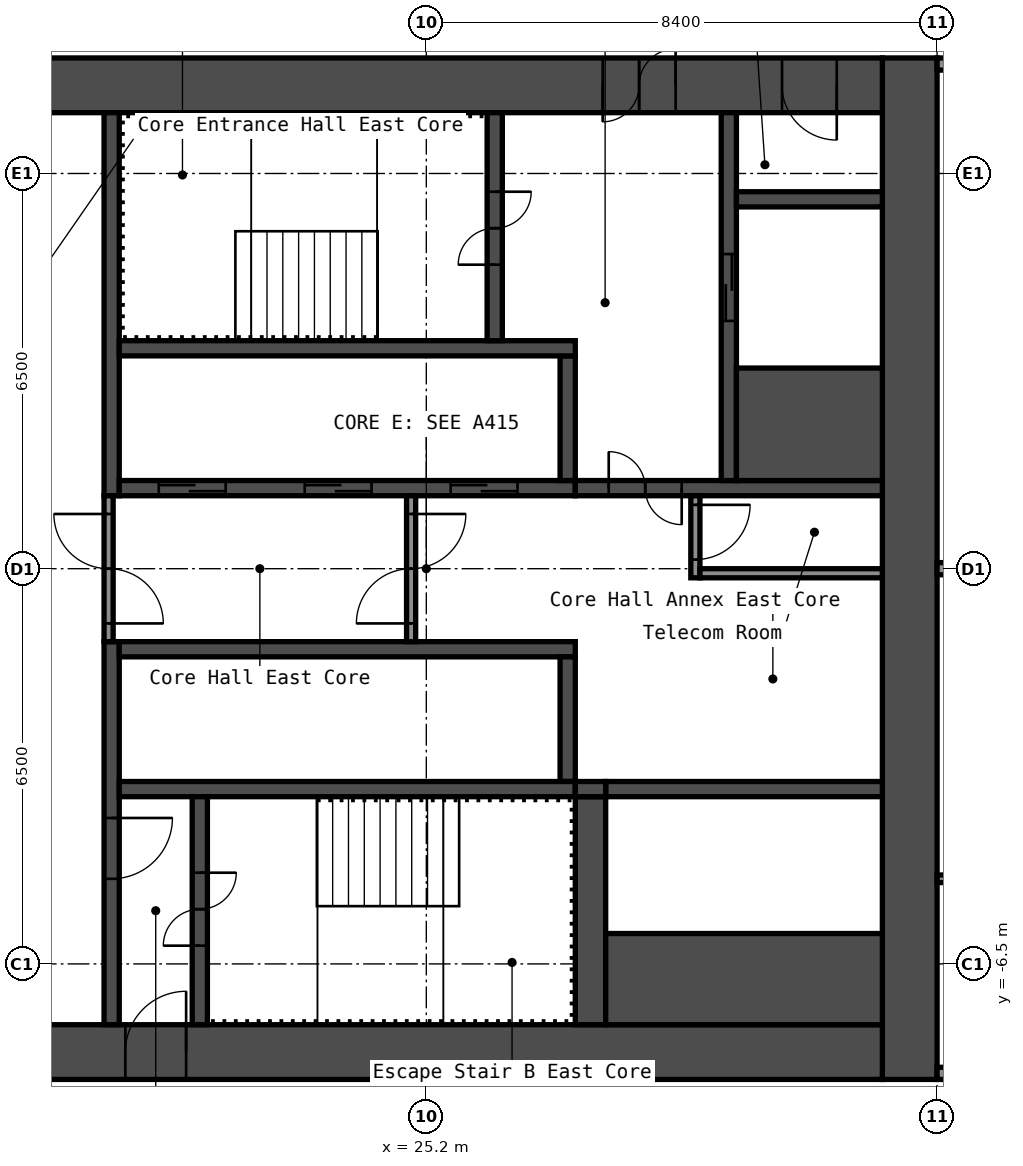
"""IFC4 building model, lengths in metres.
Left out: names, types, materials, properties, quantities, classifications, styles, units other than length and angle.
Written with IfcOpenShell. Run it as: python <this file> out.ifc"""

import sys

from ifc_helpers import new_model, si_unit, direction, frame, frame_2d, origin, place, context, subcontext, project, spatial, rectangle, extrude, element, fill, save


model = new_model("IFC4")
c1 = context("Model", 3, precision=1e-05, world=origin(), true_north=direction((0.0, 1.0)))
c2 = subcontext(c1, "Body", "Model", "MODEL_VIEW")
j1 = project(units=[si_unit("LENGTHUNIT", "METRE"), si_unit("PLANEANGLEUNIT", "RADIAN")], contexts=[c1])
p1 = place(None, origin())
s1 = spatial("IfcSite", under=j1, at=p1, CompositionType="ELEMENT")
p2 = place(p1, origin())
s2 = spatial("IfcBuilding", under=s1, at=p2, CompositionType="ELEMENT")
p3 = place(p2, frame((0.0, 0.0, 107.4)))
s3 = spatial("IfcBuildingStorey", under=s2, at=p3, CompositionType="ELEMENT", Elevation=107.4)
p4 = place(p3, frame((33.15, -8.4, 0.0), z_axis=(0.0, 0.0, 1.0), x_axis=(0.0, 1.0, 0.0)))
e1 = element("IfcWall", 1, at=p4, inside=s3, PredefinedType="SHEAR", context=c2, shape_type="SweptSolid", body=[
    extrude(rectangle(XDim=16.8, YDim=0.9, at=frame_2d((8.4, 0.0))), origin(), (0.0, 0.0, 1.0), 2.8),
])
p5 = place(p3, frame((17.7, 7.95, 0.0), z_axis=(0.0, 0.0, 1.0), x_axis=(1.0, 0.0, 0.0)))
e2 = element("IfcWall", 2, at=p5, inside=s3, PredefinedType="SHEAR", context=c2, shape_type="SweptSolid", body=[
    extrude(rectangle(XDim=15.0, YDim=0.9, at=frame_2d((7.5, 0.0))), origin(), (0.0, 0.0, 1.0), 2.8),
])
p6 = place(p5, frame((10.4, 0.0, 0.0)))
e3 = element("IfcOpeningElement", 3, at=p6, cuts=e2, PredefinedType="OPENING", context=c2, shape_type="SweptSolid", body=[
    extrude(rectangle(XDim=1.2, YDim=2.1, at=frame_2d((0.6, 1.05))), frame((0.0, 0.46, 0.0), z_axis=(0.0, -1.0, 0.0), x_axis=(1.0, 0.0, 0.0)), (0.0, 0.0, 1.0), 0.92),
])
p7 = place(p5, frame((13.35, 0.0, 0.0)))
e4 = element("IfcOpeningElement", 4, at=p7, cuts=e2, PredefinedType="OPENING", context=c2, shape_type="SweptSolid", body=[
    extrude(rectangle(XDim=0.9, YDim=2.1, at=frame_2d((0.45, 1.05))), frame((0.0, 0.46, 0.0), z_axis=(0.0, -1.0, 0.0), x_axis=(1.0, 0.0, 0.0)), (0.0, 0.0, 1.0), 0.92),
])
p8 = place(p3, frame((17.7, -7.95, 0.0), z_axis=(0.0, 0.0, 1.0), x_axis=(1.0, 0.0, 0.0)))
e5 = element("IfcWall", 5, at=p8, inside=s3, PredefinedType="SHEAR", context=c2, shape_type="SweptSolid", body=[
    extrude(rectangle(XDim=15.0, YDim=0.9, at=frame_2d((7.5, 0.0))), origin(), (0.0, 0.0, 1.0), 2.8),
])
p9 = place(p8, frame((2.55, 0.0, 0.0)))
e6 = element("IfcOpeningElement", 6, at=p9, cuts=e5, PredefinedType="OPENING", context=c2, shape_type="SweptSolid", body=[
    extrude(rectangle(XDim=1.0, YDim=2.1, at=frame_2d((0.5, 1.05))), frame((0.0, 0.46, 0.0), z_axis=(0.0, -1.0, 0.0), x_axis=(1.0, 0.0, 0.0)), (0.0, 0.0, 1.0), 0.92),
])
p10 = place(p3, frame((20.025, 1.2, 0.0), z_axis=(0.0, 0.0, 1.0), x_axis=(0.0, 1.0, 0.0)))
e7 = element("IfcWall", 7, at=p10, inside=s3, PredefinedType="SHEAR", context=c2, shape_type="SweptSolid", body=[
    extrude(rectangle(XDim=6.3, YDim=0.25, at=frame_2d((3.15, 0.0))), origin(), (0.0, 0.0, 1.0), 2.8),
])
p11 = place(p3, frame((20.025, -7.5, 0.0), z_axis=(0.0, 0.0, 1.0), x_axis=(0.0, 1.0, 0.0)))
e8 = element("IfcWall", 8, at=p11, inside=s3, PredefinedType="SHEAR", context=c2, shape_type="SweptSolid", body=[
    extrude(rectangle(XDim=6.3, YDim=0.25, at=frame_2d((3.15, 0.0))), origin(), (0.0, 0.0, 1.0), 2.8),
])
p12 = place(p11, frame((2.4, 0.0, 0.0)))
e9 = element("IfcOpeningElement", 9, at=p12, cuts=e8, PredefinedType="OPENING", context=c2, shape_type="SweptSolid", body=[
    extrude(rectangle(XDim=1.0, YDim=2.1, at=frame_2d((0.5, 1.05))), frame((0.0, 0.135, 0.0), z_axis=(0.0, -1.0, 0.0), x_axis=(1.0, 0.0, 0.0)), (0.0, 0.0, 1.0), 0.27),
])
p13 = place(p3, frame((20.15, 1.325, 0.0), z_axis=(0.0, 0.0, 1.0), x_axis=(1.0, 0.0, 0.0)))
e10 = element("IfcWall", 10, at=p13, inside=s3, PredefinedType="SHEAR", context=c2, shape_type="SweptSolid", body=[
    extrude(rectangle(XDim=7.5, YDim=0.25, at=frame_2d((3.75, 0.0))), origin(), (0.0, 0.0, 1.0), 2.8),
])
p14 = place(p13, frame((0.65, 0.0, 0.0)))
e11 = element("IfcOpeningElement", 11, at=p14, cuts=e10, PredefinedType="OPENING", context=c2, shape_type="SweptSolid", body=[
    extrude(rectangle(XDim=1.1, YDim=2.1, at=frame_2d((0.55, 1.05))), frame((0.0, 0.135, 0.0), z_axis=(0.0, -1.0, 0.0), x_axis=(1.0, 0.0, 0.0)), (0.0, 0.0, 1.0), 0.27),
])
p15 = place(p13, frame((3.05, 0.0, 0.0)))
e12 = element("IfcOpeningElement", 12, at=p15, cuts=e10, PredefinedType="OPENING", context=c2, shape_type="SweptSolid", body=[
    extrude(rectangle(XDim=1.1, YDim=2.1, at=frame_2d((0.55, 1.05))), frame((0.0, 0.135, 0.0), z_axis=(0.0, -1.0, 0.0), x_axis=(1.0, 0.0, 0.0)), (0.0, 0.0, 1.0), 0.27),
])
p16 = place(p13, frame((5.45, 0.0, 0.0)))
e13 = element("IfcOpeningElement", 13, at=p16, cuts=e10, PredefinedType="OPENING", context=c2, shape_type="SweptSolid", body=[
    extrude(rectangle(XDim=1.1, YDim=2.1, at=frame_2d((0.55, 1.05))), frame((0.0, 0.135, 0.0), z_axis=(0.0, -1.0, 0.0), x_axis=(1.0, 0.0, 0.0)), (0.0, 0.0, 1.0), 0.27),
])
p17 = place(p3, frame((27.525, 1.45, 0.0), z_axis=(0.0, 0.0, 1.0), x_axis=(0.0, 1.0, 0.0)))
e14 = element("IfcWall", 14, at=p17, inside=s3, PredefinedType="SHEAR", context=c2, shape_type="SweptSolid", body=[
    extrude(rectangle(XDim=2.05, YDim=0.25, at=frame_2d((1.025, 0.0))), origin(), (0.0, 0.0, 1.0), 2.8),
])
p18 = place(p3, frame((20.15, 3.625, 0.0), z_axis=(0.0, 0.0, 1.0), x_axis=(1.0, 0.0, 0.0)))
e15 = element("IfcWall", 15, at=p18, inside=s3, PredefinedType="SHEAR", context=c2, shape_type="SweptSolid", body=[
    extrude(rectangle(XDim=7.5, YDim=0.25, at=frame_2d((3.75, 0.0))), origin(), (0.0, 0.0, 1.0), 2.8),
])
p19 = place(p3, frame((26.325, 3.75, 0.0), z_axis=(0.0, 0.0, 1.0), x_axis=(0.0, 1.0, 0.0)))
e16 = element("IfcWall", 16, at=p19, inside=s3, PredefinedType="SHEAR", context=c2, shape_type="SweptSolid", body=[
    extrude(rectangle(XDim=3.75, YDim=0.25, at=frame_2d((1.875, 0.0))), origin(), (0.0, 0.0, 1.0), 2.8),
])
p20 = place(p19, frame((1.25, 0.0, 0.0)))
e17 = element("IfcOpeningElement", 17, at=p20, cuts=e16, PredefinedType="OPENING", context=c2, shape_type="SweptSolid", body=[
    extrude(rectangle(XDim=1.2, YDim=2.1, at=frame_2d((0.6, 1.05))), frame((0.0, 0.135, 0.0), z_axis=(0.0, -1.0, 0.0), x_axis=(1.0, 0.0, 0.0)), (0.0, 0.0, 1.0), 0.27),
])
p21 = place(p3, frame((27.65, 1.325, 0.0), z_axis=(0.0, 0.0, 1.0), x_axis=(1.0, 0.0, 0.0)))
e18 = element("IfcWall", 18, at=p21, inside=s3, PredefinedType="SHEAR", context=c2, shape_type="SweptSolid", body=[
    extrude(rectangle(XDim=5.05, YDim=0.25, at=frame_2d((2.525, 0.0))), origin(), (0.0, 0.0, 1.0), 2.8),
])
p22 = place(p21, frame((0.55, 0.0, 0.0)))
e19 = element("IfcOpeningElement", 19, at=p22, cuts=e18, PredefinedType="OPENING", context=c2, shape_type="SweptSolid", body=[
    extrude(rectangle(XDim=1.2, YDim=2.1, at=frame_2d((0.6, 1.05))), frame((0.0, 0.135, 0.0), z_axis=(0.0, -1.0, 0.0), x_axis=(1.0, 0.0, 0.0)), (0.0, 0.0, 1.0), 0.27),
])
p23 = place(p3, frame((30.175, 1.45, 0.0), z_axis=(0.0, 0.0, 1.0), x_axis=(0.0, 1.0, 0.0)))
e20 = element("IfcWall", 20, at=p23, inside=s3, PredefinedType="SHEAR", context=c2, shape_type="SweptSolid", body=[
    extrude(rectangle(XDim=6.05, YDim=0.25, at=frame_2d((3.025, 0.0))), origin(), (0.0, 0.0, 1.0), 2.8),
])
p24 = place(p23, frame((2.625, 0.0, 0.0)))
e21 = element("IfcOpeningElement", 21, at=p24, cuts=e20, PredefinedType="OPENING", context=c2, shape_type="SweptSolid", body=[
    extrude(rectangle(XDim=1.1, YDim=2.1, at=frame_2d((0.55, 1.05))), frame((0.0, 0.135, 0.0), z_axis=(0.0, -1.0, 0.0), x_axis=(1.0, 0.0, 0.0)), (0.0, 0.0, 1.0), 0.27),
])
p25 = place(p3, frame((30.3, 2.375, 0.0), z_axis=(0.0, 0.0, 1.0), x_axis=(1.0, 0.0, 0.0)))
e22 = element("IfcWall", 22, at=p25, inside=s3, PredefinedType="SHEAR", context=c2, shape_type="SweptSolid", body=[
    extrude(rectangle(XDim=2.4, YDim=1.85, at=frame_2d((1.2, 0.0))), origin(), (0.0, 0.0, 1.0), 2.8),
])
p26 = place(p3, frame((30.3, 6.075, 0.0), z_axis=(0.0, 0.0, 1.0), x_axis=(1.0, 0.0, 0.0)))
e23 = element("IfcWall", 23, at=p26, inside=s3, PredefinedType="SHEAR", context=c2, shape_type="SweptSolid", body=[
    extrude(rectangle(XDim=2.4, YDim=0.25, at=frame_2d((1.2, 0.0))), origin(), (0.0, 0.0, 1.0), 2.8),
])
p27 = place(p3, frame((20.15, -1.325, 0.0), z_axis=(0.0, 0.0, 1.0), x_axis=(1.0, 0.0, 0.0)))
e24 = element("IfcWall", 24, at=p27, inside=s3, PredefinedType="SHEAR", context=c2, shape_type="SweptSolid", body=[
    extrude(rectangle(XDim=7.5, YDim=0.25, at=frame_2d((3.75, 0.0))), origin(), (0.0, 0.0, 1.0), 2.8),
])
p28 = place(p3, frame((27.525, -3.5, 0.0), z_axis=(0.0, 0.0, 1.0), x_axis=(0.0, 1.0, 0.0)))
e25 = element("IfcWall", 25, at=p28, inside=s3, PredefinedType="SHEAR", context=c2, shape_type="SweptSolid", body=[
    extrude(rectangle(XDim=2.05, YDim=0.25, at=frame_2d((1.025, 0.0))), origin(), (0.0, 0.0, 1.0), 2.8),
])
p29 = place(p3, frame((20.15, -3.625, 0.0), z_axis=(0.0, 0.0, 1.0), x_axis=(1.0, 0.0, 0.0)))
e26 = element("IfcWall", 26, at=p29, inside=s3, PredefinedType="SHEAR", context=c2, shape_type="SweptSolid", body=[
    extrude(rectangle(XDim=7.5, YDim=0.25, at=frame_2d((3.75, 0.0))), origin(), (0.0, 0.0, 1.0), 2.8),
])
p30 = place(p3, frame((21.475, -7.5, 0.0), z_axis=(0.0, 0.0, 1.0), x_axis=(0.0, 1.0, 0.0)))
e27 = element("IfcWall", 27, at=p30, inside=s3, PredefinedType="SHEAR", context=c2, shape_type="SweptSolid", body=[
    extrude(rectangle(XDim=3.75, YDim=0.25, at=frame_2d((1.875, 0.0))), origin(), (0.0, 0.0, 1.0), 2.8),
])
p31 = place(p30, frame((1.3, 0.0, 0.0)))
e28 = element("IfcOpeningElement", 28, at=p31, cuts=e27, PredefinedType="OPENING", context=c2, shape_type="SweptSolid", body=[
    extrude(rectangle(XDim=1.2, YDim=2.1, at=frame_2d((0.6, 1.05))), frame((0.0, 0.135, 0.0), z_axis=(0.0, -1.0, 0.0), x_axis=(1.0, 0.0, 0.0)), (0.0, 0.0, 1.0), 0.27),
])
p32 = place(p3, frame((27.9, -7.5, 0.0), z_axis=(0.0, 0.0, 1.0), x_axis=(0.0, 1.0, 0.0)))
e29 = element("IfcWall", 29, at=p32, inside=s3, PredefinedType="SHEAR", context=c2, shape_type="SweptSolid", body=[
    extrude(rectangle(XDim=3.75, YDim=0.5, at=frame_2d((1.875, 0.0))), origin(), (0.0, 0.0, 1.0), 2.8),
])
p33 = place(p3, frame((28.15, -3.625, 0.0), z_axis=(0.0, 0.0, 1.0), x_axis=(1.0, 0.0, 0.0)))
e30 = element("IfcWall", 30, at=p33, inside=s3, PredefinedType="SHEAR", context=c2, shape_type="SweptSolid", body=[
    extrude(rectangle(XDim=4.55, YDim=0.25, at=frame_2d((2.275, 0.0))), origin(), (0.0, 0.0, 1.0), 2.8),
])
p34 = place(p3, frame((28.15, -6.75, 0.0), z_axis=(0.0, 0.0, 1.0), x_axis=(1.0, 0.0, 0.0)))
e31 = element("IfcWall", 31, at=p34, inside=s3, PredefinedType="SHEAR", context=c2, shape_type="SweptSolid", body=[
    extrude(rectangle(XDim=4.55, YDim=1.5, at=frame_2d((2.275, 0.0))), origin(), (0.0, 0.0, 1.0), 2.8),
])
p35 = place(p3, frame((27.65, -3.625, 0.0), z_axis=(0.0, 0.0, 1.0), x_axis=(1.0, 0.0, 0.0)))
e32 = element("IfcWall", 32, at=p35, inside=s3, PredefinedType="SHEAR", context=c2, shape_type="SweptSolid", body=[
    extrude(rectangle(XDim=0.5, YDim=0.25, at=frame_2d((0.25, 0.0))), origin(), (0.0, 0.0, 1.0), 2.8),
])
p36 = place(p3, frame((19.975, -1.2, 0.0), z_axis=(0.0, 0.0, 1.0), x_axis=(0.0, 1.0, 0.0)))
e33 = element("IfcWall", 33, at=p36, inside=s3, PredefinedType="PARTITIONING", context=c2, shape_type="SweptSolid", body=[
    extrude(rectangle(XDim=2.4, YDim=0.15, at=frame_2d((1.2, 0.0))), origin(), (0.0, 0.0, 1.0), 2.8),
])
p37 = place(p36, frame((0.3, 0.0, 0.0)))
e34 = element("IfcOpeningElement", 34, at=p37, cuts=e33, PredefinedType="OPENING", context=c2, shape_type="SweptSolid", body=[
    extrude(rectangle(XDim=1.8, YDim=2.1, at=frame_2d((0.9, 1.05))), frame((0.0, 0.085, 0.0), z_axis=(0.0, -1.0, 0.0), x_axis=(1.0, 0.0, 0.0)), (0.0, 0.0, 1.0), 0.17),
])
p38 = place(p3, frame((24.95, -1.2, 0.0), z_axis=(0.0, 0.0, 1.0), x_axis=(0.0, 1.0, 0.0)))
e35 = element("IfcWall", 35, at=p38, inside=s3, PredefinedType="PARTITIONING", context=c2, shape_type="SweptSolid", body=[
    extrude(rectangle(XDim=2.4, YDim=0.15, at=frame_2d((1.2, 0.0))), origin(), (0.0, 0.0, 1.0), 2.8),
])
p39 = place(p38, frame((0.3, 0.0, 0.0)))
e36 = element("IfcOpeningElement", 36, at=p39, cuts=e35, PredefinedType="OPENING", context=c2, shape_type="SweptSolid", body=[
    extrude(rectangle(XDim=1.8, YDim=2.1, at=frame_2d((0.9, 1.05))), frame((0.0, 0.085, 0.0), z_axis=(0.0, -1.0, 0.0), x_axis=(1.0, 0.0, 0.0)), (0.0, 0.0, 1.0), 0.17),
])
p40 = place(p3, frame((29.625, -0.15, 0.0), z_axis=(0.0, 0.0, 1.0), x_axis=(0.0, 1.0, 0.0)))
e37 = element("IfcWall", 37, at=p40, inside=s3, PredefinedType="PARTITIONING", context=c2, shape_type="SweptSolid", body=[
    extrude(rectangle(XDim=1.35, YDim=0.15, at=frame_2d((0.675, 0.0))), origin(), (0.0, 0.0, 1.0), 2.8),
])
p41 = place(p40, frame((0.3, 0.0, 0.0)))
e38 = element("IfcOpeningElement", 38, at=p41, cuts=e37, PredefinedType="OPENING", context=c2, shape_type="SweptSolid", body=[
    extrude(rectangle(XDim=0.9, YDim=2.1, at=frame_2d((0.45, 1.05))), frame((0.0, 0.085, 0.0), z_axis=(0.0, -1.0, 0.0), x_axis=(1.0, 0.0, 0.0)), (0.0, 0.0, 1.0), 0.17),
])
p42 = place(p3, frame((29.7, -0.075, 0.0), z_axis=(0.0, 0.0, 1.0), x_axis=(1.0, 0.0, 0.0)))
e39 = element("IfcWall", 39, at=p42, inside=s3, PredefinedType="PARTITIONING", context=c2, shape_type="SweptSolid", body=[
    extrude(rectangle(XDim=3.0, YDim=0.15, at=frame_2d((1.5, 0.0))), origin(), (0.0, 0.0, 1.0), 2.8),
])
p43 = place(p3, frame((33.6, -8.3, 0.0), z_axis=(0.0, 0.0, 1.0), x_axis=(1.0, 0.0, 0.0)))
e40 = element("IfcWall", 40, at=p43, inside=s3, PredefinedType="PARTITIONING", context=c2, shape_type="SweptSolid", body=[
    extrude(rectangle(XDim=10.4, YDim=0.2, at=frame_2d((5.2, 0.0))), origin(), (0.0, 0.0, 1.0), 2.8),
])
p44 = place(p43, frame((7.3, 0.0, 0.0)))
e41 = element("IfcOpeningElement", 41, at=p44, cuts=e40, PredefinedType="OPENING", context=c2, shape_type="SweptSolid", body=[
    extrude(rectangle(XDim=1.0, YDim=2.1, at=frame_2d((0.5, 1.05))), frame((0.0, 0.11, 0.0), z_axis=(0.0, -1.0, 0.0), x_axis=(1.0, 0.0, 0.0)), (0.0, 0.0, 1.0), 0.22),
])
p45 = place(p3, frame((33.6, -5.1, 0.0), z_axis=(0.0, 0.0, 1.0), x_axis=(1.0, 0.0, 0.0)))
e42 = element("IfcWall", 42, at=p45, inside=s3, PredefinedType="PARTITIONING", context=c2, shape_type="SweptSolid", body=[
    extrude(rectangle(XDim=2.938, YDim=0.125, at=frame_2d((1.469, 0.0))), origin(), (0.0, 0.0, 1.0), 2.8),
])
p46 = place(p45, frame((1.1, 0.0, 0.0)))
e43 = element("IfcOpeningElement", 43, at=p46, cuts=e42, PredefinedType="OPENING", context=c2, shape_type="SweptSolid", body=[
    extrude(rectangle(XDim=0.8, YDim=2.1, at=frame_2d((0.4, 1.05))), frame((0.0, 0.073, 0.0), z_axis=(0.0, -1.0, 0.0), x_axis=(1.0, 0.0, 0.0)), (0.0, 0.0, 1.0), 0.145),
])
p47 = place(p3, frame((33.6, 0.0, 0.0), z_axis=(0.0, 0.0, 1.0), x_axis=(1.0, 0.0, 0.0)))
e44 = element("IfcWall", 44, at=p47, inside=s3, PredefinedType="PARTITIONING", context=c2, shape_type="SweptSolid", body=[
    extrude(rectangle(XDim=10.3, YDim=0.2, at=frame_2d((5.15, 0.0))), origin(), (0.0, 0.0, 1.0), 2.8),
])
p48 = place(p3, frame((33.6, 8.3, 0.0), z_axis=(0.0, 0.0, 1.0), x_axis=(1.0, 0.0, 0.0)))
e45 = element("IfcWall", 45, at=p48, inside=s3, PredefinedType="PARTITIONING", context=c2, shape_type="SweptSolid", body=[
    extrude(rectangle(XDim=10.4, YDim=0.2, at=frame_2d((5.2, 0.0))), origin(), (0.0, 0.0, 1.0), 2.8),
])
p49 = place(p48, frame((2.1, 0.0, 0.0)))
e46 = element("IfcOpeningElement", 46, at=p49, cuts=e45, PredefinedType="OPENING", context=c2, shape_type="SweptSolid", body=[
    extrude(rectangle(XDim=1.0, YDim=2.1, at=frame_2d((0.5, 1.05))), frame((0.0, 0.11, 0.0), z_axis=(0.0, -1.0, 0.0), x_axis=(1.0, 0.0, 0.0)), (0.0, 0.0, 1.0), 0.22),
])
p50 = place(p6, origin())
e47 = element("IfcDoor", 47, at=p50, inside=s3, OperationType="DOUBLE_DOOR_SINGLE_SWING", PredefinedType="DOOR", context=c2, shape_type="SweptSolid", body=[
    extrude(rectangle(XDim=1.2, YDim=2.1, at=frame_2d((0.6, 1.05))), frame((0.0, 0.025, 0.0), z_axis=(0.0, -1.0, 0.0), x_axis=(1.0, 0.0, 0.0)), (0.0, 0.0, 1.0), 0.05),
])
fill(e3, e47)
p51 = place(p7, origin())
e48 = element("IfcDoor", 48, at=p51, inside=s3, OperationType="SINGLE_SWING_RIGHT", PredefinedType="DOOR", context=c2, shape_type="SweptSolid", body=[
    extrude(rectangle(XDim=0.9, YDim=2.1, at=frame_2d((0.45, 1.05))), frame((0.0, 0.025, 0.0), z_axis=(0.0, -1.0, 0.0), x_axis=(1.0, 0.0, 0.0)), (0.0, 0.0, 1.0), 0.05),
])
fill(e4, e48)
p52 = place(p9, origin())
e49 = element("IfcDoor", 49, at=p52, inside=s3, OperationType="SINGLE_SWING_LEFT", PredefinedType="DOOR", context=c2, shape_type="SweptSolid", body=[
    extrude(rectangle(XDim=1.0, YDim=2.1, at=frame_2d((0.5, 1.05))), frame((0.0, 0.025, 0.0), z_axis=(0.0, -1.0, 0.0), x_axis=(1.0, 0.0, 0.0)), (0.0, 0.0, 1.0), 0.05),
])
fill(e6, e49)
p53 = place(p20, origin())
e50 = element("IfcDoor", 50, at=p53, inside=s3, OperationType="DOUBLE_DOOR_SINGLE_SWING", PredefinedType="DOOR", context=c2, shape_type="SweptSolid", body=[
    extrude(rectangle(XDim=1.2, YDim=2.1, at=frame_2d((0.6, 1.05))), frame((0.0, 0.025, 0.0), z_axis=(0.0, -1.0, 0.0), x_axis=(1.0, 0.0, 0.0)), (0.0, 0.0, 1.0), 0.05),
])
fill(e17, e50)
p54 = place(p31, origin())
e51 = element("IfcDoor", 51, at=p54, inside=s3, OperationType="DOUBLE_DOOR_SINGLE_SWING", PredefinedType="DOOR", context=c2, shape_type="SweptSolid", body=[
    extrude(rectangle(XDim=1.2, YDim=2.1, at=frame_2d((0.6, 1.05))), frame((0.0, 0.025, 0.0), z_axis=(0.0, -1.0, 0.0), x_axis=(1.0, 0.0, 0.0)), (0.0, 0.0, 1.0), 0.05),
])
fill(e28, e51)
p55 = place(p12, origin())
e52 = element("IfcDoor", 52, at=p55, inside=s3, OperationType="SINGLE_SWING_RIGHT", PredefinedType="DOOR", context=c2, shape_type="SweptSolid", body=[
    extrude(rectangle(XDim=1.0, YDim=2.1, at=frame_2d((0.5, 1.05))), frame((0.0, 0.025, 0.0), z_axis=(0.0, -1.0, 0.0), x_axis=(1.0, 0.0, 0.0)), (0.0, 0.0, 1.0), 0.05),
])
fill(e9, e52)
p56 = place(p22, origin())
e53 = element("IfcDoor", 53, at=p56, inside=s3, OperationType="DOUBLE_DOOR_SINGLE_SWING", PredefinedType="DOOR", context=c2, shape_type="SweptSolid", body=[
    extrude(rectangle(XDim=1.2, YDim=2.1, at=frame_2d((0.6, 1.05))), frame((0.0, 0.025, 0.0), z_axis=(0.0, -1.0, 0.0), x_axis=(1.0, 0.0, 0.0)), (0.0, 0.0, 1.0), 0.05),
])
fill(e19, e53)
p57 = place(p37, origin())
e54 = element("IfcDoor", 54, at=p57, inside=s3, OperationType="DOUBLE_DOOR_SINGLE_SWING", PredefinedType="DOOR", context=c2, shape_type="SweptSolid", body=[
    extrude(rectangle(XDim=1.8, YDim=2.1, at=frame_2d((0.9, 1.05))), frame((0.0, 0.025, 0.0), z_axis=(0.0, -1.0, 0.0), x_axis=(1.0, 0.0, 0.0)), (0.0, 0.0, 1.0), 0.05),
])
fill(e34, e54)
p58 = place(p39, origin())
e55 = element("IfcDoor", 55, at=p58, inside=s3, OperationType="DOUBLE_DOOR_SINGLE_SWING", PredefinedType="DOOR", context=c2, shape_type="SweptSolid", body=[
    extrude(rectangle(XDim=1.8, YDim=2.1, at=frame_2d((0.9, 1.05))), frame((0.0, 0.025, 0.0), z_axis=(0.0, -1.0, 0.0), x_axis=(1.0, 0.0, 0.0)), (0.0, 0.0, 1.0), 0.05),
])
fill(e36, e55)
p59 = place(p41, origin())
e56 = element("IfcDoor", 56, at=p59, inside=s3, OperationType="SINGLE_SWING_RIGHT", PredefinedType="DOOR", context=c2, shape_type="SweptSolid", body=[
    extrude(rectangle(XDim=0.9, YDim=2.1, at=frame_2d((0.45, 1.05))), frame((0.0, 0.025, 0.0), z_axis=(0.0, -1.0, 0.0), x_axis=(1.0, 0.0, 0.0)), (0.0, 0.0, 1.0), 0.05),
])
fill(e38, e56)
p60 = place(p14, origin())
e57 = element("IfcDoor", 57, at=p60, inside=s3, OperationType="DOUBLE_DOOR_SLIDING", PredefinedType="DOOR", context=c2, shape_type="SweptSolid", body=[
    extrude(rectangle(XDim=1.1, YDim=2.1, at=frame_2d((0.55, 1.05))), frame((0.0, 0.025, 0.0), z_axis=(0.0, -1.0, 0.0), x_axis=(1.0, 0.0, 0.0)), (0.0, 0.0, 1.0), 0.05),
])
fill(e11, e57)
p61 = place(p15, origin())
e58 = element("IfcDoor", 58, at=p61, inside=s3, OperationType="DOUBLE_DOOR_SLIDING", PredefinedType="DOOR", context=c2, shape_type="SweptSolid", body=[
    extrude(rectangle(XDim=1.1, YDim=2.1, at=frame_2d((0.55, 1.05))), frame((0.0, 0.025, 0.0), z_axis=(0.0, -1.0, 0.0), x_axis=(1.0, 0.0, 0.0)), (0.0, 0.0, 1.0), 0.05),
])
fill(e12, e58)
p62 = place(p16, origin())
e59 = element("IfcDoor", 59, at=p62, inside=s3, OperationType="DOUBLE_DOOR_SLIDING", PredefinedType="DOOR", context=c2, shape_type="SweptSolid", body=[
    extrude(rectangle(XDim=1.1, YDim=2.1, at=frame_2d((0.55, 1.05))), frame((0.0, 0.025, 0.0), z_axis=(0.0, -1.0, 0.0), x_axis=(1.0, 0.0, 0.0)), (0.0, 0.0, 1.0), 0.05),
])
fill(e13, e59)
p63 = place(p24, origin())
e60 = element("IfcDoor", 60, at=p63, inside=s3, OperationType="DOUBLE_DOOR_SLIDING", PredefinedType="DOOR", context=c2, shape_type="SweptSolid", body=[
    extrude(rectangle(XDim=1.1, YDim=2.1, at=frame_2d((0.55, 1.05))), frame((0.0, 0.025, 0.0), z_axis=(0.0, -1.0, 0.0), x_axis=(1.0, 0.0, 0.0)), (0.0, 0.0, 1.0), 0.05),
])
fill(e21, e60)
save(model, sys.argv[1])
